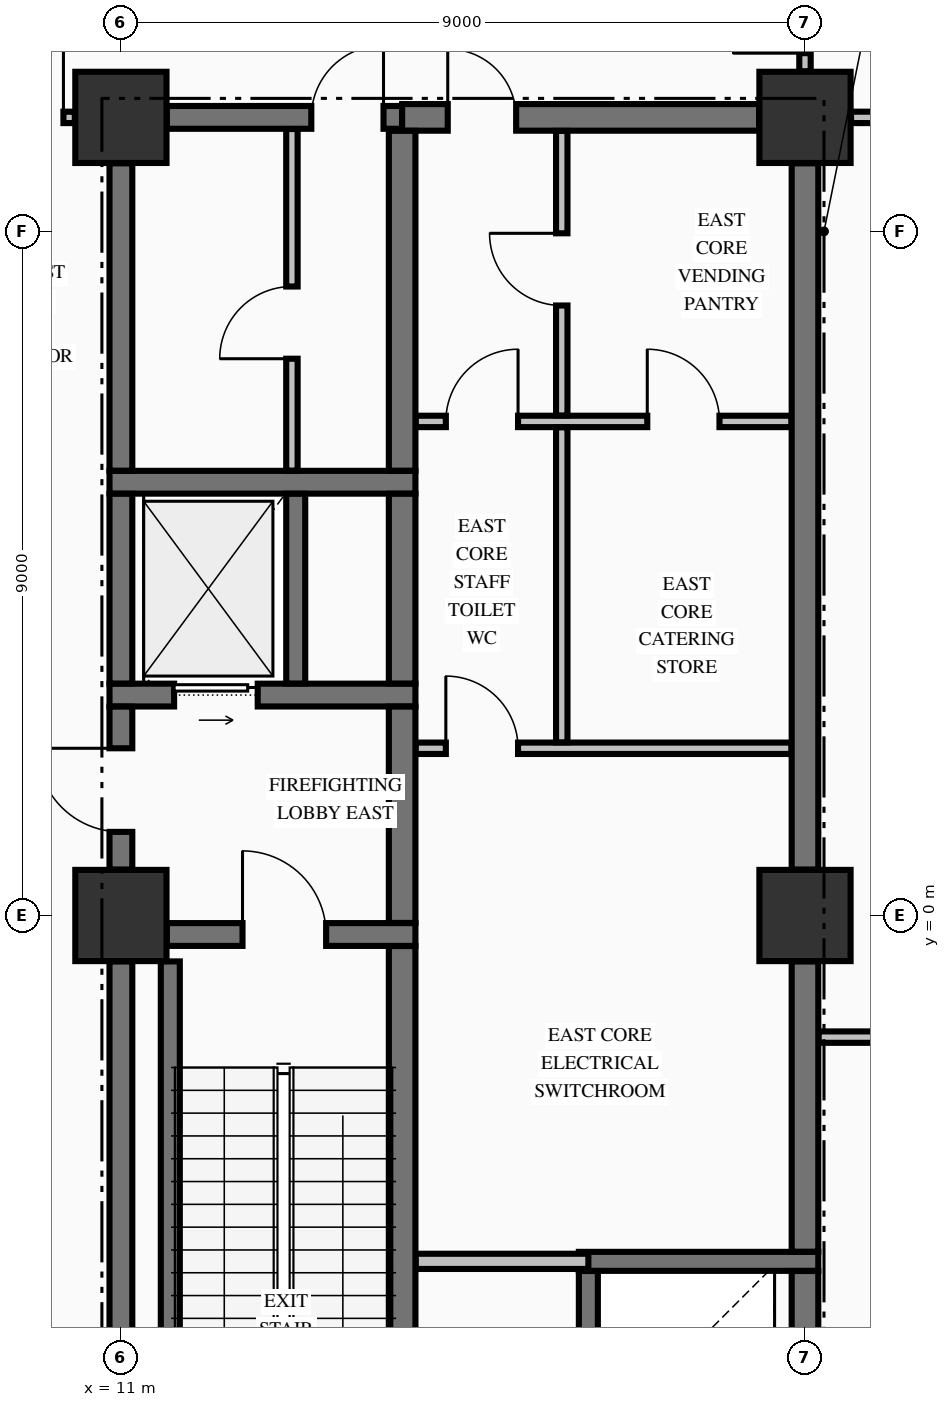
"""IFC4 building model, lengths in metres.
Left out: names, types, materials, properties, quantities, classifications, styles, units other than length and angle.
Written with IfcOpenShell. Run it as: python <this file> out.ifc"""

import sys

from ifc_helpers import new_model, si_unit, direction, frame, frame_2d, origin, origin_2d, place, context, subcontext, project, spatial, rectangle, extrude, element, fill, save


model = new_model("IFC4")
c1 = context("Model", 3, precision=1e-05, world=origin(), true_north=direction((0.0, 1.0)))
c2 = subcontext(c1, "Body", "Model", "MODEL_VIEW")
j1 = project(units=[si_unit("LENGTHUNIT", "METRE"), si_unit("PLANEANGLEUNIT", "RADIAN")], contexts=[c1])
p1 = place(None, origin())
s1 = spatial("IfcSite", under=j1, at=p1, CompositionType="ELEMENT")
p2 = place(p1, origin())
s2 = spatial("IfcBuilding", under=s1, at=p2, CompositionType="ELEMENT")
p3 = place(p2, frame((0.0, 0.0, 52.19)))
s3 = spatial("IfcBuildingStorey", under=s2, at=p3, CompositionType="ELEMENT", Elevation=52.19)
for number, where, z_axis, x_axis in (
    (1, (11.0, 0.0, -0.425), (0.0, 0.0, 1.0), (1.0, 0.0, 0.0)),
    (2, (11.0, 10.5, -0.425), (0.0, 0.0, 1.0), (1.0, 0.0, 0.0)),
    (3, (20.0, 10.5, -0.425), (0.0, 0.0, 1.0), (1.0, 0.0, 0.0)),
    (4, (20.0, 0.0, -0.425), (0.0, 0.0, 1.0), (1.0, 0.0, 0.0)),
):
    element("IfcColumn", number, at=place(p3, frame(where, z_axis=z_axis, x_axis=x_axis)), inside=s3, PredefinedType="COLUMN", context=c2, shape_type="SweptSolid", body=[
        extrude(rectangle(XDim=1.2, YDim=1.2, at=origin_2d()), origin(), (0.0, 0.0, 1.0), 5.0),
    ])
p4 = place(p3, frame((17.025, -4.55, 0.0), z_axis=(0.0, 0.0, 1.0), x_axis=(1.0, 0.0, 0.0)))
e5 = element("IfcWall", 5, at=p4, inside=s3, PredefinedType="SOLIDWALL", context=c2, shape_type="SweptSolid", body=[
    extrude(rectangle(XDim=3.15, YDim=0.25, at=frame_2d((1.575, 0.0))), origin(), (0.0, 0.0, 1.0), 4.575),
])
p5 = place(p3, frame((11.604, -0.25, 0.0), z_axis=(0.0, 0.0, 1.0), x_axis=(1.0, 0.0, 0.0)))
e6 = element("IfcWall", 6, at=p5, inside=s3, PredefinedType="SHEAR", context=c2, shape_type="SweptSolid", body=[
    extrude(rectangle(XDim=3.271, YDim=0.3, at=frame_2d((1.635, 0.0))), origin(), (0.0, 0.0, 1.0), 4.575),
])
p6 = place(p5, frame((0.996, 0.0, 0.0)))
e7 = element("IfcOpeningElement", 7, at=p6, cuts=e6, PredefinedType="OPENING", context=c2, shape_type="SweptSolid", body=[
    extrude(rectangle(XDim=1.1, YDim=2.15, at=frame_2d((0.55, 1.075))), frame((0.0, 0.16, 0.0), z_axis=(0.0, -1.0, 0.0), x_axis=(1.0, 0.0, 0.0)), (0.0, 0.0, 1.0), 0.32),
])
p7 = place(p3, frame((10.85, 2.9, 0.0), z_axis=(0.0, 0.0, 1.0), x_axis=(1.0, 0.0, 0.0)))
e8 = element("IfcWall", 8, at=p7, inside=s3, PredefinedType="SHEAR", context=c2, shape_type="SweptSolid", body=[
    extrude(rectangle(XDim=4.025, YDim=0.3, at=frame_2d((2.012, 0.0))), origin(), (0.0, 0.0, 1.0), 4.575),
])
p8 = place(p7, frame((0.85, 0.0, 0.0)))
e9 = element("IfcOpeningElement", 9, at=p8, cuts=e8, PredefinedType="OPENING", context=c2, shape_type="SweptSolid", body=[
    extrude(rectangle(XDim=1.1, YDim=2.2, at=frame_2d((0.55, 1.1))), frame((0.0, 0.16, 0.0), z_axis=(0.0, -1.0, 0.0), x_axis=(1.0, 0.0, 0.0)), (0.0, 0.0, 1.0), 0.32),
])
p9 = place(p3, frame((10.85, 5.7, 0.0), z_axis=(0.0, 0.0, 1.0), x_axis=(1.0, 0.0, 0.0)))
e10 = element("IfcWall", 10, at=p9, inside=s3, PredefinedType="SHEAR", context=c2, shape_type="SweptSolid", body=[
    extrude(rectangle(XDim=4.025, YDim=0.3, at=frame_2d((2.012, 0.0))), origin(), (0.0, 0.0, 1.0), 4.575),
])
p10 = place(p3, frame((11.604, 10.5, 0.0), z_axis=(0.0, 0.0, 1.0), x_axis=(1.0, 0.0, 0.0)))
e11 = element("IfcWall", 11, at=p10, inside=s3, PredefinedType="SHEAR", context=c2, shape_type="SweptSolid", body=[
    extrude(rectangle(XDim=3.096, YDim=0.3, at=frame_2d((1.548, 0.0))), origin(), (0.0, 0.0, 1.0), 4.575),
])
p11 = place(p10, frame((1.901, 0.0, 0.0)))
e12 = element("IfcOpeningElement", 12, at=p11, cuts=e11, PredefinedType="OPENING", context=c2, shape_type="SweptSolid", body=[
    extrude(rectangle(XDim=0.95, YDim=2.15, at=frame_2d((0.475, 1.075))), frame((0.0, 0.16, 0.0), z_axis=(0.0, -1.0, 0.0), x_axis=(1.0, 0.0, 0.0)), (0.0, 0.0, 1.0), 0.32),
])
p12 = place(p3, frame((14.7, 10.5, 0.0), z_axis=(0.0, 0.0, 1.0), x_axis=(1.0, 0.0, 0.0)))
e13 = element("IfcWall", 13, at=p12, inside=s3, PredefinedType="SHEAR", context=c2, shape_type="SweptSolid", body=[
    extrude(rectangle(XDim=4.696, YDim=0.35, at=frame_2d((2.348, 0.0))), origin(), (0.0, 0.0, 1.0), 4.575),
])
p13 = place(p12, frame((0.6, 0.0, 0.0)))
e14 = element("IfcOpeningElement", 14, at=p13, cuts=e13, PredefinedType="OPENING", context=c2, shape_type="SweptSolid", body=[
    extrude(rectangle(XDim=0.9, YDim=2.15, at=frame_2d((0.45, 1.075))), frame((0.0, 0.185, 0.0), z_axis=(0.0, -1.0, 0.0), x_axis=(1.0, 0.0, 0.0)), (0.0, 0.0, 1.0), 0.37),
])
p14 = place(p3, frame((14.878, -4.55, 0.0), z_axis=(0.0, 0.0, 1.0), x_axis=(1.0, 0.0, 0.0)))
e15 = element("IfcWall", 15, at=p14, inside=s3, PredefinedType="PARTITIONING", context=c2, shape_type="SweptSolid", body=[
    extrude(rectangle(XDim=2.272, YDim=0.2, at=frame_2d((1.136, 0.0))), origin(), (0.0, 0.0, 1.0), 4.575),
])
p15 = place(p3, frame((20.178, -1.6, 0.0), z_axis=(0.0, 0.0, 1.0), x_axis=(1.0, 0.0, 0.0)))
e16 = element("IfcWall", 16, at=p15, inside=s3, PredefinedType="PARTITIONING", context=c2, shape_type="SweptSolid", body=[
    extrude(rectangle(XDim=8.657, YDim=0.15, at=frame_2d((4.329, 0.0))), origin(), (0.0, 0.0, 1.0), 4.575),
])
p16 = place(p3, frame((14.878, 2.2, 0.0), z_axis=(0.0, 0.0, 1.0), x_axis=(1.0, 0.0, 0.0)))
e17 = element("IfcWall", 17, at=p16, inside=s3, PredefinedType="PARTITIONING", context=c2, shape_type="SweptSolid", body=[
    extrude(rectangle(XDim=4.944, YDim=0.15, at=frame_2d((2.472, 0.0))), origin(), (0.0, 0.0, 1.0), 4.575),
])
p17 = place(p16, frame((0.397, 0.0, 0.0)))
e18 = element("IfcOpeningElement", 18, at=p17, cuts=e17, PredefinedType="OPENING", context=c2, shape_type="SweptSolid", body=[
    extrude(rectangle(XDim=0.95, YDim=2.15, at=frame_2d((0.475, 1.075))), frame((0.0, 0.085, 0.0), z_axis=(0.0, -1.0, 0.0), x_axis=(1.0, 0.0, 0.0)), (0.0, 0.0, 1.0), 0.17),
])
p18 = place(p3, frame((14.878, 6.5, 0.0), z_axis=(0.0, 0.0, 1.0), x_axis=(1.0, 0.0, 0.0)))
e19 = element("IfcWall", 19, at=p18, inside=s3, PredefinedType="PARTITIONING", context=c2, shape_type="SweptSolid", body=[
    extrude(rectangle(XDim=4.944, YDim=0.15, at=frame_2d((2.472, 0.0))), origin(), (0.0, 0.0, 1.0), 4.575),
])
p19 = place(p18, frame((0.397, 0.0, 0.0)))
e20 = element("IfcOpeningElement", 20, at=p19, cuts=e19, PredefinedType="OPENING", context=c2, shape_type="SweptSolid", body=[
    extrude(rectangle(XDim=0.95, YDim=2.15, at=frame_2d((0.475, 1.075))), frame((0.0, 0.085, 0.0), z_axis=(0.0, -1.0, 0.0), x_axis=(1.0, 0.0, 0.0)), (0.0, 0.0, 1.0), 0.17),
])
p20 = place(p18, frame((3.047, 0.0, 0.0)))
e21 = element("IfcOpeningElement", 21, at=p20, cuts=e19, PredefinedType="OPENING", context=c2, shape_type="SweptSolid", body=[
    extrude(rectangle(XDim=0.95, YDim=2.15, at=frame_2d((0.475, 1.075))), frame((0.0, 0.085, 0.0), z_axis=(0.0, -1.0, 0.0), x_axis=(1.0, 0.0, 0.0)), (0.0, 0.0, 1.0), 0.17),
])
p21 = place(p3, frame((-10.394, 10.5, 0.0), z_axis=(0.0, 0.0, 1.0), x_axis=(1.0, 0.0, 0.0)))
e22 = element("IfcWall", 22, at=p21, inside=s3, PredefinedType="PARTITIONING", context=c2, shape_type="SweptSolid", body=[
    extrude(rectangle(XDim=20.788, YDim=0.15, at=frame_2d((10.394, 0.0))), origin(), (0.0, 0.0, 1.0), 4.575),
])
p22 = place(p21, frame((0.15, 0.0, 0.0)))
e23 = element("IfcOpeningElement", 23, at=p22, cuts=e22, PredefinedType="OPENING", context=c2, shape_type="SweptSolid", body=[
    extrude(rectangle(XDim=1.05, YDim=2.15, at=frame_2d((0.525, 1.075))), frame((0.0, 0.085, 0.0), z_axis=(0.0, -1.0, 0.0), x_axis=(1.0, 0.0, 0.0)), (0.0, 0.0, 1.0), 0.17),
])
p23 = place(p21, frame((19.588, 0.0, 0.0)))
e24 = element("IfcOpeningElement", 24, at=p23, cuts=e22, PredefinedType="OPENING", context=c2, shape_type="SweptSolid", body=[
    extrude(rectangle(XDim=1.05, YDim=2.15, at=frame_2d((0.525, 1.075))), frame((0.0, 0.085, 0.0), z_axis=(0.0, -1.0, 0.0), x_axis=(1.0, 0.0, 0.0)), (0.0, 0.0, 1.0), 0.17),
])
p24 = place(p3, frame((20.606, 10.5, 0.0), z_axis=(0.0, 0.0, 1.0), x_axis=(1.0, 0.0, 0.0)))
e25 = element("IfcWall", 25, at=p24, inside=s3, PredefinedType="PARTITIONING", context=c2, shape_type="SweptSolid", body=[
    extrude(rectangle(XDim=8.229, YDim=0.15, at=frame_2d((4.115, 0.0))), origin(), (0.0, 0.0, 1.0), 4.575),
])
p25 = place(p24, frame((3.419, 0.0, 0.0)))
e26 = element("IfcOpeningElement", 26, at=p25, cuts=e25, PredefinedType="OPENING", context=c2, shape_type="SweptSolid", body=[
    extrude(rectangle(XDim=0.95, YDim=2.02, at=frame_2d((0.475, 1.01))), frame((0.0, 0.085, 0.0), z_axis=(0.0, -1.0, 0.0), x_axis=(1.0, 0.0, 0.0)), (0.0, 0.0, 1.0), 0.17),
])
p26 = place(p3, frame((11.0, -9.346, 0.0), z_axis=(0.0, 0.0, 1.0), x_axis=(0.0, 1.0, 0.0)))
e27 = element("IfcWall", 27, at=p26, inside=s3, PredefinedType="SHEAR", context=c2, shape_type="SweptSolid", body=[
    extrude(rectangle(XDim=8.742, YDim=0.3, at=frame_2d((4.371, 0.0))), origin(), (0.0, 0.0, 1.0), 4.575),
])
p27 = place(p3, frame((11.0, 0.604, 0.0), z_axis=(0.0, 0.0, 1.0), x_axis=(0.0, 1.0, 0.0)))
e28 = element("IfcWall", 28, at=p27, inside=s3, PredefinedType="SHEAR", context=c2, shape_type="SweptSolid", body=[
    extrude(rectangle(XDim=2.144, YDim=0.3, at=frame_2d((1.072, 0.0))), origin(), (0.0, 0.0, 1.0), 4.575),
])
p28 = place(p27, frame((0.496, 0.0, 0.0)))
e29 = element("IfcOpeningElement", 29, at=p28, cuts=e28, PredefinedType="OPENING", context=c2, shape_type="SweptSolid", body=[
    extrude(rectangle(XDim=1.1, YDim=2.15, at=frame_2d((0.55, 1.075))), frame((0.0, 0.16, 0.0), z_axis=(0.0, -1.0, 0.0), x_axis=(1.0, 0.0, 0.0)), (0.0, 0.0, 1.0), 0.32),
])
p29 = place(p3, frame((11.0, 3.052, 0.0), z_axis=(0.0, 0.0, 1.0), x_axis=(0.0, 1.0, 0.0)))
e30 = element("IfcWall", 30, at=p29, inside=s3, PredefinedType="SHEAR", context=c2, shape_type="SweptSolid", body=[
    extrude(rectangle(XDim=2.496, YDim=0.3, at=frame_2d((1.248, 0.0))), origin(), (0.0, 0.0, 1.0), 4.575),
])
p30 = place(p3, frame((11.0, 5.852, 0.0), z_axis=(0.0, 0.0, 1.0), x_axis=(0.0, 1.0, 0.0)))
e31 = element("IfcWall", 31, at=p30, inside=s3, PredefinedType="SHEAR", context=c2, shape_type="SweptSolid", body=[
    extrude(rectangle(XDim=4.044, YDim=0.3, at=frame_2d((2.022, 0.0))), origin(), (0.0, 0.0, 1.0), 4.575),
])
p31 = place(p3, frame((11.65, -9.346, 0.0), z_axis=(0.0, 0.0, 1.0), x_axis=(0.0, 1.0, 0.0)))
e32 = element("IfcWall", 32, at=p31, inside=s3, PredefinedType="SOLIDWALL", context=c2, shape_type="SweptSolid", body=[
    extrude(rectangle(XDim=8.742, YDim=0.25, at=frame_2d((4.371, 0.0))), origin(), (0.0, 0.0, 1.0), 4.575),
])
p32 = place(p3, frame((13.3, 3.052, 0.0), z_axis=(0.0, 0.0, 1.0), x_axis=(0.0, 1.0, 0.0)))
e33 = element("IfcWall", 33, at=p32, inside=s3, PredefinedType="SOLIDWALL", context=c2, shape_type="SweptSolid", body=[
    extrude(rectangle(XDim=2.496, YDim=0.25, at=frame_2d((1.248, 0.0))), origin(), (0.0, 0.0, 1.0), 4.575),
])
p33 = place(p3, frame((14.7, -9.773, 0.0), z_axis=(0.0, 0.0, 1.0), x_axis=(0.0, 1.0, 0.0)))
e34 = element("IfcWall", 34, at=p33, inside=s3, PredefinedType="SHEAR", context=c2, shape_type="SweptSolid", body=[
    extrude(rectangle(XDim=9.371, YDim=0.35, at=frame_2d((4.686, 0.0))), origin(), (0.0, 0.0, 1.0), 4.575),
])
p34 = place(p3, frame((14.7, -0.098, 0.0), z_axis=(0.0, 0.0, 1.0), x_axis=(0.0, 1.0, 0.0)))
e35 = element("IfcWall", 35, at=p34, inside=s3, PredefinedType="SHEAR", context=c2, shape_type="SweptSolid", body=[
    extrude(rectangle(XDim=2.846, YDim=0.35, at=frame_2d((1.423, 0.0))), origin(), (0.0, 0.0, 1.0), 4.575),
])
p35 = place(p3, frame((14.7, 3.052, 0.0), z_axis=(0.0, 0.0, 1.0), x_axis=(0.0, 1.0, 0.0)))
e36 = element("IfcWall", 36, at=p35, inside=s3, PredefinedType="SHEAR", context=c2, shape_type="SweptSolid", body=[
    extrude(rectangle(XDim=2.496, YDim=0.35, at=frame_2d((1.248, 0.0))), origin(), (0.0, 0.0, 1.0), 4.575),
])
p36 = place(p3, frame((14.7, 5.852, 0.0), z_axis=(0.0, 0.0, 1.0), x_axis=(0.0, 1.0, 0.0)))
e37 = element("IfcWall", 37, at=p36, inside=s3, PredefinedType="SHEAR", context=c2, shape_type="SweptSolid", body=[
    extrude(rectangle(XDim=4.471, YDim=0.35, at=frame_2d((2.235, 0.0))), origin(), (0.0, 0.0, 1.0), 4.575),
])
p37 = place(p3, frame((17.15, -6.923, 0.0), z_axis=(0.0, 0.0, 1.0), x_axis=(0.0, 1.0, 0.0)))
e38 = element("IfcWall", 38, at=p37, inside=s3, PredefinedType="SOLIDWALL", context=c2, shape_type="SweptSolid", body=[
    extrude(rectangle(XDim=2.246, YDim=0.25, at=frame_2d((1.123, 0.0))), origin(), (0.0, 0.0, 1.0), 4.575),
])
p38 = place(p3, frame((20.0, -6.923, 0.0), z_axis=(0.0, 0.0, 1.0), x_axis=(0.0, 1.0, 0.0)))
e39 = element("IfcWall", 39, at=p38, inside=s3, PredefinedType="SHEAR", context=c2, shape_type="SweptSolid", body=[
    extrude(rectangle(XDim=2.246, YDim=0.35, at=frame_2d((1.123, 0.0))), origin(), (0.0, 0.0, 1.0), 4.575),
])
p39 = place(p3, frame((20.0, -4.423, 0.0), z_axis=(0.0, 0.0, 1.0), x_axis=(0.0, 1.0, 0.0)))
e40 = element("IfcWall", 40, at=p39, inside=s3, PredefinedType="SHEAR", context=c2, shape_type="SweptSolid", body=[
    extrude(rectangle(XDim=3.819, YDim=0.35, at=frame_2d((1.91, 0.0))), origin(), (0.0, 0.0, 1.0), 4.575),
])
p40 = place(p3, frame((20.0, 0.604, 0.0), z_axis=(0.0, 0.0, 1.0), x_axis=(0.0, 1.0, 0.0)))
e41 = element("IfcWall", 41, at=p40, inside=s3, PredefinedType="SHEAR", context=c2, shape_type="SweptSolid", body=[
    extrude(rectangle(XDim=9.292, YDim=0.35, at=frame_2d((4.646, 0.0))), origin(), (0.0, 0.0, 1.0), 4.575),
])
p41 = place(p3, frame((13.25, 5.853, 0.0), z_axis=(0.0, 0.0, 1.0), x_axis=(0.0, 1.0, 0.0)))
e42 = element("IfcWall", 42, at=p41, inside=s3, PredefinedType="PARTITIONING", context=c2, shape_type="SweptSolid", body=[
    extrude(rectangle(XDim=4.494, YDim=0.15, at=frame_2d((2.247, 0.0))), origin(), (0.0, 0.0, 1.0), 4.575),
])
p42 = place(p41, frame((1.472, 0.0, 0.0)))
e43 = element("IfcOpeningElement", 43, at=p42, cuts=e42, PredefinedType="OPENING", context=c2, shape_type="SweptSolid", body=[
    extrude(rectangle(XDim=0.95, YDim=2.15, at=frame_2d((0.475, 1.075))), frame((0.0, 0.085, 0.0), z_axis=(0.0, -1.0, 0.0), x_axis=(1.0, 0.0, 0.0)), (0.0, 0.0, 1.0), 0.17),
])
p43 = place(p3, frame((16.8, 2.278, 0.0), z_axis=(0.0, 0.0, 1.0), x_axis=(0.0, 1.0, 0.0)))
e44 = element("IfcWall", 44, at=p43, inside=s3, PredefinedType="PARTITIONING", context=c2, shape_type="SweptSolid", body=[
    extrude(rectangle(XDim=4.144, YDim=0.15, at=frame_2d((2.072, 0.0))), origin(), (0.0, 0.0, 1.0), 4.575),
])
p44 = place(p3, frame((16.8, 6.578, 0.0), z_axis=(0.0, 0.0, 1.0), x_axis=(0.0, 1.0, 0.0)))
e45 = element("IfcWall", 45, at=p44, inside=s3, PredefinedType="PARTITIONING", context=c2, shape_type="SweptSolid", body=[
    extrude(rectangle(XDim=3.744, YDim=0.15, at=frame_2d((1.872, 0.0))), origin(), (0.0, 0.0, 1.0), 4.575),
])
p45 = place(p44, frame((1.447, 0.0, 0.0)))
e46 = element("IfcOpeningElement", 46, at=p45, cuts=e45, PredefinedType="OPENING", context=c2, shape_type="SweptSolid", body=[
    extrude(rectangle(XDim=0.95, YDim=2.15, at=frame_2d((0.475, 1.075))), frame((0.0, 0.085, 0.0), z_axis=(0.0, -1.0, 0.0), x_axis=(1.0, 0.0, 0.0)), (0.0, 0.0, 1.0), 0.17),
])
p46 = place(p3, frame((20.0, 11.106, 0.0), z_axis=(0.0, 0.0, 1.0), x_axis=(0.0, 1.0, 0.0)))
e47 = element("IfcWall", 47, at=p46, inside=s3, PredefinedType="PARTITIONING", context=c2, shape_type="SweptSolid", body=[
    extrude(rectangle(XDim=1.966, YDim=0.15, at=frame_2d((0.983, 0.0))), origin(), (0.0, 0.0, 1.0), 4.575),
])
p47 = place(p46, frame((0.239, 0.0, 0.0)))
e48 = element("IfcOpeningElement", 48, at=p47, cuts=e47, PredefinedType="OPENING", context=c2, shape_type="SweptSolid", body=[
    extrude(rectangle(XDim=0.95, YDim=2.02, at=frame_2d((0.475, 1.01))), frame((0.0, 0.085, 0.0), z_axis=(0.0, -1.0, 0.0), x_axis=(1.0, 0.0, 0.0)), (0.0, 0.0, 1.0), 0.17),
])
p48 = place(p6, origin())
e49 = element("IfcDoor", 49, at=p48, inside=s3, OperationType="SINGLE_SWING_LEFT", PredefinedType="DOOR", context=c2, shape_type="SweptSolid", body=[
    extrude(rectangle(XDim=1.1, YDim=2.15, at=frame_2d((0.55, 1.075))), frame((0.0, 0.025, 0.0), z_axis=(0.0, -1.0, 0.0), x_axis=(1.0, 0.0, 0.0)), (0.0, 0.0, 1.0), 0.05),
])
fill(e7, e49)
p49 = place(p28, origin())
e50 = element("IfcDoor", 50, at=p49, inside=s3, OperationType="SINGLE_SWING_RIGHT", PredefinedType="DOOR", context=c2, shape_type="SweptSolid", body=[
    extrude(rectangle(XDim=1.1, YDim=2.15, at=frame_2d((0.55, 1.075))), frame((0.0, 0.025, 0.0), z_axis=(0.0, -1.0, 0.0), x_axis=(1.0, 0.0, 0.0)), (0.0, 0.0, 1.0), 0.05),
])
fill(e29, e50)
p50 = place(p8, origin())
e51 = element("IfcDoor", 51, at=p50, inside=s3, OperationType="SLIDING_TO_RIGHT", PredefinedType="DOOR", context=c2, shape_type="SweptSolid", body=[
    extrude(rectangle(XDim=1.1, YDim=2.2, at=frame_2d((0.55, 1.1))), frame((0.0, 0.025, 0.0), z_axis=(0.0, -1.0, 0.0), x_axis=(1.0, 0.0, 0.0)), (0.0, 0.0, 1.0), 0.05),
])
fill(e9, e51)
p51 = place(p11, origin())
e52 = element("IfcDoor", 52, at=p51, inside=s3, OperationType="SINGLE_SWING_RIGHT", PredefinedType="DOOR", context=c2, shape_type="SweptSolid", body=[
    extrude(rectangle(XDim=0.95, YDim=2.15, at=frame_2d((0.475, 1.075))), frame((0.0, 0.025, 0.0), z_axis=(0.0, -1.0, 0.0), x_axis=(1.0, 0.0, 0.0)), (0.0, 0.0, 1.0), 0.05),
])
fill(e12, e52)
p52 = place(p42, origin())
e53 = element("IfcDoor", 53, at=p52, inside=s3, OperationType="SINGLE_SWING_LEFT", PredefinedType="DOOR", context=c2, shape_type="SweptSolid", body=[
    extrude(rectangle(XDim=0.95, YDim=2.15, at=frame_2d((0.475, 1.075))), frame((0.0, 0.025, 0.0), z_axis=(0.0, -1.0, 0.0), x_axis=(1.0, 0.0, 0.0)), (0.0, 0.0, 1.0), 0.05),
])
fill(e43, e53)
p53 = place(p13, origin())
e54 = element("IfcDoor", 54, at=p53, inside=s3, OperationType="SINGLE_SWING_LEFT", PredefinedType="DOOR", context=c2, shape_type="SweptSolid", body=[
    extrude(rectangle(XDim=0.9, YDim=2.15, at=frame_2d((0.45, 1.075))), frame((0.0, 0.025, 0.0), z_axis=(0.0, -1.0, 0.0), x_axis=(1.0, 0.0, 0.0)), (0.0, 0.0, 1.0), 0.05),
])
fill(e14, e54)
p54 = place(p19, origin())
e55 = element("IfcDoor", 55, at=p54, inside=s3, OperationType="SINGLE_SWING_RIGHT", PredefinedType="DOOR", context=c2, shape_type="SweptSolid", body=[
    extrude(rectangle(XDim=0.95, YDim=2.15, at=frame_2d((0.475, 1.075))), frame((0.0, 0.025, 0.0), z_axis=(0.0, -1.0, 0.0), x_axis=(1.0, 0.0, 0.0)), (0.0, 0.0, 1.0), 0.05),
])
fill(e20, e55)
p55 = place(p17, origin())
e56 = element("IfcDoor", 56, at=p55, inside=s3, OperationType="SINGLE_SWING_LEFT", PredefinedType="DOOR", context=c2, shape_type="SweptSolid", body=[
    extrude(rectangle(XDim=0.95, YDim=2.15, at=frame_2d((0.475, 1.075))), frame((0.0, 0.025, 0.0), z_axis=(0.0, -1.0, 0.0), x_axis=(1.0, 0.0, 0.0)), (0.0, 0.0, 1.0), 0.05),
])
fill(e18, e56)
p56 = place(p45, origin())
e57 = element("IfcDoor", 57, at=p56, inside=s3, OperationType="SINGLE_SWING_RIGHT", PredefinedType="DOOR", context=c2, shape_type="SweptSolid", body=[
    extrude(rectangle(XDim=0.95, YDim=2.15, at=frame_2d((0.475, 1.075))), frame((0.0, 0.025, 0.0), z_axis=(0.0, -1.0, 0.0), x_axis=(1.0, 0.0, 0.0)), (0.0, 0.0, 1.0), 0.05),
])
fill(e46, e57)
p57 = place(p20, origin())
e58 = element("IfcDoor", 58, at=p57, inside=s3, OperationType="SINGLE_SWING_LEFT", PredefinedType="DOOR", context=c2, shape_type="SweptSolid", body=[
    extrude(rectangle(XDim=0.95, YDim=2.15, at=frame_2d((0.475, 1.075))), frame((0.0, 0.025, 0.0), z_axis=(0.0, -1.0, 0.0), x_axis=(1.0, 0.0, 0.0)), (0.0, 0.0, 1.0), 0.05),
])
fill(e21, e58)
p58 = place(p23, origin())
e59 = element("IfcDoor", 59, at=p58, inside=s3, OperationType="SINGLE_SWING_RIGHT", PredefinedType="DOOR", context=c2, shape_type="SweptSolid", body=[
    extrude(rectangle(XDim=1.05, YDim=2.15, at=frame_2d((0.525, 1.075))), frame((0.0, 0.025, 0.0), z_axis=(0.0, -1.0, 0.0), x_axis=(1.0, 0.0, 0.0)), (0.0, 0.0, 1.0), 0.05),
])
fill(e24, e59)
p59 = place(p47, origin())
e60 = element("IfcDoor", 60, at=p59, inside=s3, OperationType="SINGLE_SWING_LEFT", PredefinedType="DOOR", context=c2, shape_type="SweptSolid", body=[
    extrude(rectangle(XDim=0.95, YDim=2.02, at=frame_2d((0.475, 1.01))), frame((0.0, 0.025, 0.0), z_axis=(0.0, -1.0, 0.0), x_axis=(1.0, 0.0, 0.0)), (0.0, 0.0, 1.0), 0.05),
])
fill(e48, e60)
save(model, sys.argv[1])
